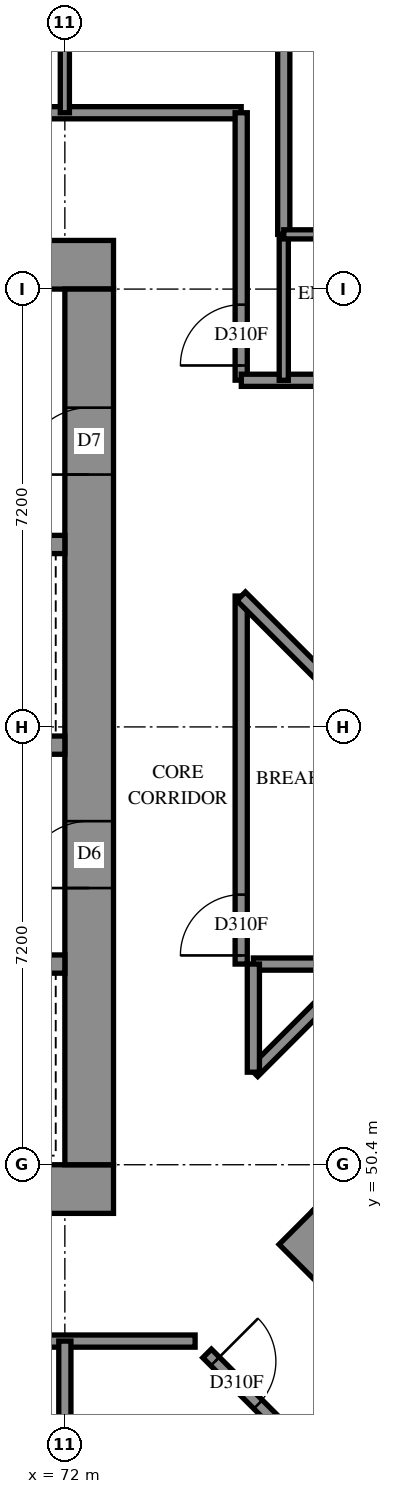
"""IFC4 building model, lengths in metres.
Left out: names, types, materials, properties, quantities, classifications, styles, units other than length and angle.
Written with IfcOpenShell. Run it as: python <this file> out.ifc"""

import sys

from ifc_helpers import new_model, si_unit, direction, frame, frame_2d, origin, place, context, subcontext, project, spatial, rectangle, extrude, element, fill, save


model = new_model("IFC4")
c1 = context("Model", 3, precision=1e-05, world=origin(), true_north=direction((0.0, 1.0)))
c2 = subcontext(c1, "Body", "Model", "MODEL_VIEW")
j1 = project(units=[si_unit("LENGTHUNIT", "METRE"), si_unit("PLANEANGLEUNIT", "RADIAN")], contexts=[c1])
p1 = place(None, origin())
s1 = spatial("IfcSite", under=j1, at=p1, CompositionType="ELEMENT")
p2 = place(p1, origin())
s2 = spatial("IfcBuilding", under=s1, at=p2, CompositionType="ELEMENT")
p3 = place(p2, frame((0.0, 0.0, 98.2)))
s3 = spatial("IfcBuildingStorey", under=s2, at=p3, CompositionType="ELEMENT", Elevation=98.2)
p4 = place(p3, frame((56.8, 50.0, -0.3), z_axis=(0.0, 0.0, 1.0), x_axis=(1.0, 0.0, 0.0)))
e1 = element("IfcWall", 1, at=p4, inside=s3, PredefinedType="SHEAR", context=c2, shape_type="SweptSolid", body=[
    extrude(rectangle(XDim=16.0, YDim=0.8, at=frame_2d((8.0, 0.0))), origin(), (0.0, 0.0, 1.0), 2.7),
])
p5 = place(p3, frame((56.8, 65.2, -0.3), z_axis=(0.0, 0.0, 1.0), x_axis=(1.0, 0.0, 0.0)))
e2 = element("IfcWall", 2, at=p5, inside=s3, PredefinedType="SHEAR", context=c2, shape_type="SweptSolid", body=[
    extrude(rectangle(XDim=16.0, YDim=0.8, at=frame_2d((8.0, 0.0))), origin(), (0.0, 0.0, 1.0), 2.7),
])
p6 = place(p5, frame((10.8, 0.0, 0.3)))
e3 = element("IfcOpeningElement", 3, at=p6, cuts=e2, PredefinedType="OPENING", context=c2, shape_type="SweptSolid", body=[
    extrude(rectangle(XDim=0.8, YDim=2.1, at=frame_2d((0.4, 1.05))), frame((0.0, 0.41, 0.0), z_axis=(0.0, -1.0, 0.0), x_axis=(1.0, 0.0, 0.0)), (0.0, 0.0, 1.0), 0.82),
])
p7 = place(p3, frame((72.4, 50.4, -0.3), z_axis=(0.0, 0.0, 1.0), x_axis=(0.0, 1.0, 0.0)))
e4 = element("IfcWall", 4, at=p7, inside=s3, PredefinedType="SHEAR", context=c2, shape_type="SweptSolid", body=[
    extrude(rectangle(XDim=14.4, YDim=0.8, at=frame_2d((7.2, 0.0))), origin(), (0.0, 0.0, 1.0), 2.7),
])
p8 = place(p7, frame((4.55, 0.0, 0.3)))
e5 = element("IfcOpeningElement", 5, at=p8, cuts=e4, PredefinedType="OPENING", context=c2, shape_type="SweptSolid", body=[
    extrude(rectangle(XDim=1.1, YDim=2.1, at=frame_2d((0.55, 1.05))), frame((0.0, 0.41, 0.0), z_axis=(0.0, -1.0, 0.0), x_axis=(1.0, 0.0, 0.0)), (0.0, 0.0, 1.0), 0.82),
])
p9 = place(p7, frame((11.35, 0.0, 0.3)))
e6 = element("IfcOpeningElement", 6, at=p9, cuts=e4, PredefinedType="OPENING", context=c2, shape_type="SweptSolid", body=[
    extrude(rectangle(XDim=1.1, YDim=2.1, at=frame_2d((0.55, 1.05))), frame((0.0, 0.41, 0.0), z_axis=(0.0, -1.0, 0.0), x_axis=(1.0, 0.0, 0.0)), (0.0, 0.0, 1.0), 0.82),
])
p10 = place(p3, frame((57.6, 53.7, 0.0), z_axis=(0.0, 0.0, 1.0), x_axis=(1.0, 0.0, 0.0)))
e7 = element("IfcWall", 7, at=p10, inside=s3, PredefinedType="SOLIDWALL", context=c2, shape_type="SweptSolid", body=[
    extrude(rectangle(XDim=14.4, YDim=0.3, at=frame_2d((7.2, 0.0))), origin(), (0.0, 0.0, 1.0), 3.1),
])
p11 = place(p10, frame((1.25, 0.0, 0.0)))
e8 = element("IfcOpeningElement", 8, at=p11, cuts=e7, PredefinedType="OPENING", context=c2, shape_type="SweptSolid", body=[
    extrude(rectangle(XDim=1.1, YDim=2.1, at=frame_2d((0.55, 1.05))), frame((0.0, 0.16, 0.0), z_axis=(0.0, -1.0, 0.0), x_axis=(1.0, 0.0, 0.0)), (0.0, 0.0, 1.0), 0.32),
])
p12 = place(p10, frame((4.85, 0.0, 0.0)))
e9 = element("IfcOpeningElement", 9, at=p12, cuts=e7, PredefinedType="OPENING", context=c2, shape_type="SweptSolid", body=[
    extrude(rectangle(XDim=1.1, YDim=2.1, at=frame_2d((0.55, 1.05))), frame((0.0, 0.16, 0.0), z_axis=(0.0, -1.0, 0.0), x_axis=(1.0, 0.0, 0.0)), (0.0, 0.0, 1.0), 0.32),
])
p13 = place(p10, frame((8.45, 0.0, 0.0)))
e10 = element("IfcOpeningElement", 10, at=p13, cuts=e7, PredefinedType="OPENING", context=c2, shape_type="SweptSolid", body=[
    extrude(rectangle(XDim=1.1, YDim=2.1, at=frame_2d((0.55, 1.05))), frame((0.0, 0.16, 0.0), z_axis=(0.0, -1.0, 0.0), x_axis=(1.0, 0.0, 0.0)), (0.0, 0.0, 1.0), 0.32),
])
p14 = place(p10, frame((12.05, 0.0, 0.0)))
e11 = element("IfcOpeningElement", 11, at=p14, cuts=e7, PredefinedType="OPENING", context=c2, shape_type="SweptSolid", body=[
    extrude(rectangle(XDim=1.1, YDim=2.1, at=frame_2d((0.55, 1.05))), frame((0.0, 0.16, 0.0), z_axis=(0.0, -1.0, 0.0), x_axis=(1.0, 0.0, 0.0)), (0.0, 0.0, 1.0), 0.32),
])
p15 = place(p3, frame((57.6, 57.3, 0.0), z_axis=(0.0, 0.0, 1.0), x_axis=(1.0, 0.0, 0.0)))
e12 = element("IfcWall", 12, at=p15, inside=s3, PredefinedType="SOLIDWALL", context=c2, shape_type="SweptSolid", body=[
    extrude(rectangle(XDim=14.4, YDim=0.3, at=frame_2d((7.2, 0.0))), origin(), (0.0, 0.0, 1.0), 3.1),
])
p16 = place(p15, frame((12.05, 0.0, 0.0)))
e13 = element("IfcOpeningElement", 13, at=p16, cuts=e12, PredefinedType="OPENING", context=c2, shape_type="SweptSolid", body=[
    extrude(rectangle(XDim=1.1, YDim=2.1, at=frame_2d((0.55, 1.05))), frame((0.0, 0.16, 0.0), z_axis=(0.0, -1.0, 0.0), x_axis=(1.0, 0.0, 0.0)), (0.0, 0.0, 1.0), 0.32),
])
p17 = place(p3, frame((64.8, 60.6, 0.0), z_axis=(0.0, 0.0, 1.0), x_axis=(1.0, 0.0, 0.0)))
e14 = element("IfcWall", 14, at=p17, inside=s3, PredefinedType="SOLIDWALL", context=c2, shape_type="SweptSolid", body=[
    extrude(rectangle(XDim=7.2, YDim=0.3, at=frame_2d((3.6, 0.0))), origin(), (0.0, 0.0, 1.0), 3.1),
])
p18 = place(p3, frame((75.806, 49.373, -0.3), z_axis=(0.0, 0.0, 1.0), x_axis=(0.7071067812, -0.7071067812, 0.0)))
e15 = element("IfcWall", 15, at=p18, inside=s3, PredefinedType="SHEAR", context=c2, shape_type="SweptSolid", body=[
    extrude(rectangle(XDim=16.0, YDim=0.8, at=frame_2d((8.0, 0.0))), origin(), (0.0, 0.0, 1.0), 2.7),
])
p19 = place(p3, frame((76.372, 49.373, -0.3), z_axis=(0.0, 0.0, 1.0), x_axis=(0.7071067812, 0.7071067812, 0.0)))
e16 = element("IfcWall", 16, at=p19, inside=s3, PredefinedType="SHEAR", context=c2, shape_type="SweptSolid", body=[
    extrude(rectangle(XDim=14.4, YDim=0.8, at=frame_2d((7.2, 0.0))), origin(), (0.0, 0.0, 1.0), 2.7),
])
p20 = place(p19, frame((4.55, 0.0, 0.3)))
e17 = element("IfcOpeningElement", 17, at=p20, cuts=e16, PredefinedType="OPENING", context=c2, shape_type="SweptSolid", body=[
    extrude(rectangle(XDim=1.1, YDim=2.1, at=frame_2d((0.55, 1.05))), frame((0.0, 0.41, 0.0), z_axis=(0.0, -1.0, 0.0), x_axis=(1.0, 0.0, 0.0)), (0.0, 0.0, 1.0), 0.82),
])
p21 = place(p19, frame((11.35, 0.0, 0.3)))
e18 = element("IfcOpeningElement", 18, at=p21, cuts=e16, PredefinedType="OPENING", context=c2, shape_type="SweptSolid", body=[
    extrude(rectangle(XDim=1.1, YDim=2.1, at=frame_2d((0.55, 1.05))), frame((0.0, 0.41, 0.0), z_axis=(0.0, -1.0, 0.0), x_axis=(1.0, 0.0, 0.0)), (0.0, 0.0, 1.0), 0.82),
])
p22 = place(p3, frame((54.7, 67.7, 0.0), z_axis=(0.0, 0.0, 1.0), x_axis=(1.0, 0.0, 0.0)))
e19 = element("IfcWall", 19, at=p22, inside=s3, PredefinedType="PARTITIONING", context=c2, shape_type="SweptSolid", body=[
    extrude(rectangle(XDim=20.2, YDim=0.2, at=frame_2d((10.1, 0.0))), origin(), (0.0, 0.0, 1.0), 3.1),
])
p23 = place(p22, frame((5.25, 0.0, 0.0)))
e20 = element("IfcOpeningElement", 20, at=p23, cuts=e19, PredefinedType="OPENING", context=c2, shape_type="SweptSolid", body=[
    extrude(rectangle(XDim=0.9, YDim=2.1, at=frame_2d((0.45, 1.05))), frame((0.0, 0.11, 0.0), z_axis=(0.0, -1.0, 0.0), x_axis=(1.0, 0.0, 0.0)), (0.0, 0.0, 1.0), 0.22),
])
p24 = place(p22, frame((6.9, 0.0, 0.0)))
e21 = element("IfcOpeningElement", 21, at=p24, cuts=e19, PredefinedType="OPENING", context=c2, shape_type="SweptSolid", body=[
    extrude(rectangle(XDim=0.9, YDim=2.1, at=frame_2d((0.45, 1.05))), frame((0.0, 0.11, 0.0), z_axis=(0.0, -1.0, 0.0), x_axis=(1.0, 0.0, 0.0)), (0.0, 0.0, 1.0), 0.22),
])
p25 = place(p22, frame((12.45, 0.0, 0.0)))
e22 = element("IfcOpeningElement", 22, at=p25, cuts=e19, PredefinedType="OPENING", context=c2, shape_type="SweptSolid", body=[
    extrude(rectangle(XDim=0.9, YDim=2.1, at=frame_2d((0.45, 1.05))), frame((0.0, 0.11, 0.0), z_axis=(0.0, -1.0, 0.0), x_axis=(1.0, 0.0, 0.0)), (0.0, 0.0, 1.0), 0.22),
])
p26 = place(p22, frame((14.1, 0.0, 0.0)))
e23 = element("IfcOpeningElement", 23, at=p26, cuts=e19, PredefinedType="OPENING", context=c2, shape_type="SweptSolid", body=[
    extrude(rectangle(XDim=0.9, YDim=2.1, at=frame_2d((0.45, 1.05))), frame((0.0, 0.11, 0.0), z_axis=(0.0, -1.0, 0.0), x_axis=(1.0, 0.0, 0.0)), (0.0, 0.0, 1.0), 0.22),
])
p27 = place(p3, frame((54.7, 47.5, 0.0), z_axis=(0.0, 0.0, 1.0), x_axis=(1.0, 0.0, 0.0)))
e24 = element("IfcWall", 24, at=p27, inside=s3, PredefinedType="PARTITIONING", context=c2, shape_type="SweptSolid", body=[
    extrude(rectangle(XDim=19.442, YDim=0.2, at=frame_2d((9.721, 0.0))), origin(), (0.0, 0.0, 1.0), 3.1),
])
p28 = place(p27, frame((5.2, 0.0, 0.0)))
e25 = element("IfcOpeningElement", 25, at=p28, cuts=e24, PredefinedType="OPENING", context=c2, shape_type="SweptSolid", body=[
    extrude(rectangle(XDim=0.9, YDim=2.1, at=frame_2d((0.45, 1.05))), frame((0.0, 0.11, 0.0), z_axis=(0.0, -1.0, 0.0), x_axis=(1.0, 0.0, 0.0)), (0.0, 0.0, 1.0), 0.22),
])
p29 = place(p27, frame((6.9, 0.0, 0.0)))
e26 = element("IfcOpeningElement", 26, at=p29, cuts=e24, PredefinedType="OPENING", context=c2, shape_type="SweptSolid", body=[
    extrude(rectangle(XDim=0.9, YDim=2.1, at=frame_2d((0.45, 1.05))), frame((0.0, 0.11, 0.0), z_axis=(0.0, -1.0, 0.0), x_axis=(1.0, 0.0, 0.0)), (0.0, 0.0, 1.0), 0.22),
])
p30 = place(p27, frame((13.963, 0.0, 0.0)))
e27 = element("IfcOpeningElement", 27, at=p30, cuts=e24, PredefinedType="OPENING", context=c2, shape_type="SweptSolid", body=[
    extrude(rectangle(XDim=1.0, YDim=2.1, at=frame_2d((0.5, 1.05))), frame((0.0, 0.11, 0.0), z_axis=(0.0, -1.0, 0.0), x_axis=(1.0, 0.0, 0.0)), (0.0, 0.0, 1.0), 0.22),
])
p31 = place(p3, frame((75.6, 65.7, 0.0), z_axis=(0.0, 0.0, 1.0), x_axis=(0.0, 1.0, 0.0)))
e28 = element("IfcWall", 28, at=p31, inside=s3, PredefinedType="PARTITIONING", context=c2, shape_type="SweptSolid", body=[
    extrude(rectangle(XDim=7.033, YDim=0.2, at=frame_2d((3.517, 0.0))), origin(), (0.0, 0.0, 1.0), 3.1),
])
p32 = place(p3, frame((74.9, 53.7, 0.0), z_axis=(0.0, 0.0, 1.0), x_axis=(0.0, 1.0, 0.0)))
e29 = element("IfcWall", 29, at=p32, inside=s3, PredefinedType="PARTITIONING", context=c2, shape_type="SweptSolid", body=[
    extrude(rectangle(XDim=6.052, YDim=0.2, at=frame_2d((3.026, 0.0))), origin(), (0.0, 0.0, 1.0), 3.1),
])
p33 = place(p32, frame((0.142, 0.0, 0.0)))
e30 = element("IfcOpeningElement", 30, at=p33, cuts=e29, PredefinedType="OPENING", context=c2, shape_type="SweptSolid", body=[
    extrude(rectangle(XDim=1.0, YDim=2.1, at=frame_2d((0.5, 1.05))), frame((0.0, 0.11, 0.0), z_axis=(0.0, -1.0, 0.0), x_axis=(1.0, 0.0, 0.0)), (0.0, 0.0, 1.0), 0.22),
])
p34 = place(p3, frame((74.9, 63.302, 0.0), z_axis=(0.0, 0.0, 1.0), x_axis=(0.0, 1.0, 0.0)))
e31 = element("IfcWall", 31, at=p34, inside=s3, PredefinedType="PARTITIONING", context=c2, shape_type="SweptSolid", body=[
    extrude(rectangle(XDim=4.398, YDim=0.2, at=frame_2d((2.199, 0.0))), origin(), (0.0, 0.0, 1.0), 3.1),
])
p35 = place(p34, frame((0.242, 0.0, 0.0)))
e32 = element("IfcOpeningElement", 32, at=p35, cuts=e31, PredefinedType="OPENING", context=c2, shape_type="SweptSolid", body=[
    extrude(rectangle(XDim=1.0, YDim=2.1, at=frame_2d((0.5, 1.05))), frame((0.0, 0.11, 0.0), z_axis=(0.0, -1.0, 0.0), x_axis=(1.0, 0.0, 0.0)), (0.0, 0.0, 1.0), 0.22),
])
p36 = place(p3, frame((74.902, 63.3, 0.0), z_axis=(0.0, 0.0, 1.0), x_axis=(1.0, 0.0, 0.0)))
e33 = element("IfcWall", 33, at=p36, inside=s3, PredefinedType="PARTITIONING", context=c2, shape_type="SweptSolid", body=[
    extrude(rectangle(XDim=4.298, YDim=0.2, at=frame_2d((2.149, 0.0))), origin(), (0.0, 0.0, 1.0), 3.1),
])
p37 = place(p36, frame((2.888, 0.0, 0.0)))
e34 = element("IfcOpeningElement", 34, at=p37, cuts=e33, PredefinedType="OPENING", context=c2, shape_type="SweptSolid", body=[
    extrude(rectangle(XDim=0.9, YDim=2.1, at=frame_2d((0.45, 1.05))), frame((0.0, 0.11, 0.0), z_axis=(0.0, -1.0, 0.0), x_axis=(1.0, 0.0, 0.0)), (0.0, 0.0, 1.0), 0.22),
])
p38 = place(p3, frame((72.0, 43.7, 0.0), z_axis=(0.0, 0.0, 1.0), x_axis=(0.0, 1.0, 0.0)))
e35 = element("IfcWall", 35, at=p38, inside=s3, PredefinedType="PARTITIONING", context=c2, shape_type="SweptSolid", body=[
    extrude(rectangle(XDim=3.8, YDim=0.2, at=frame_2d((1.9, 0.0))), origin(), (0.0, 0.0, 1.0), 3.1),
])
p39 = place(p3, frame((74.899, 59.749, 0.0), z_axis=(0.0, 0.0, 1.0), x_axis=(0.7071067812, -0.7071067812, 0.0)))
e36 = element("IfcWall", 36, at=p39, inside=s3, PredefinedType="PARTITIONING", context=c2, shape_type="SweptSolid", body=[
    extrude(rectangle(XDim=3.601, YDim=0.2, at=frame_2d((1.8, 0.0))), origin(), (0.0, 0.0, 1.0), 3.1),
])
p40 = place(p3, frame((75.102, 51.922, 0.0), z_axis=(0.0, 0.0, 1.0), x_axis=(0.7071067812, 0.7071067812, 0.0)))
e37 = element("IfcWall", 37, at=p40, inside=s3, PredefinedType="PARTITIONING", context=c2, shape_type="SweptSolid", body=[
    extrude(rectangle(XDim=2.514, YDim=0.2, at=frame_2d((1.257, 0.0))), origin(), (0.0, 0.0, 1.0), 3.1),
])
for number, where, z_axis, x_axis in (
    (38, (75.6, 63.3, 0.0), (0.0, 0.0, 1.0), (0.0, 1.0, 0.0)),
    (39, (72.0, 67.7, 0.0), (0.0, 0.0, 1.0), (0.0, 1.0, 0.0)),
):
    element("IfcWall", number, at=place(p3, frame(where, z_axis=z_axis, x_axis=x_axis)), inside=s3, PredefinedType="PARTITIONING", context=c2, shape_type="SweptSolid", body=[
        extrude(rectangle(XDim=2.4, YDim=0.15, at=frame_2d((1.2, 0.0))), origin(), (0.0, 0.0, 1.0), 3.1),
    ])
p41 = place(p3, frame((75.6, 65.7, 0.0), z_axis=(0.0, 0.0, 1.0), x_axis=(1.0, 0.0, 0.0)))
e40 = element("IfcWall", 40, at=p41, inside=s3, PredefinedType="PARTITIONING", context=c2, shape_type="SweptSolid", body=[
    extrude(rectangle(XDim=1.9, YDim=0.15, at=frame_2d((0.95, 0.0))), origin(), (0.0, 0.0, 1.0), 3.1),
])
p42 = place(p41, frame((0.607, 0.0, 0.0)))
e41 = element("IfcOpeningElement", 41, at=p42, cuts=e40, PredefinedType="OPENING", context=c2, shape_type="SweptSolid", body=[
    extrude(rectangle(XDim=0.8, YDim=2.1, at=frame_2d((0.4, 1.05))), frame((0.0, 0.085, 0.0), z_axis=(0.0, -1.0, 0.0), x_axis=(1.0, 0.0, 0.0)), (0.0, 0.0, 1.0), 0.17),
])
p43 = place(p3, frame((75.1, 53.7, 0.0), z_axis=(0.0, 0.0, 1.0), x_axis=(1.0, 0.0, 0.0)))
e42 = element("IfcWall", 42, at=p43, inside=s3, PredefinedType="PARTITIONING", context=c2, shape_type="SweptSolid", body=[
    extrude(rectangle(XDim=1.78, YDim=0.2, at=frame_2d((0.89, 0.0))), origin(), (0.0, 0.0, 1.0), 3.1),
])
p44 = place(p3, frame((74.339, 47.297, 0.0), z_axis=(0.0, 0.0, 1.0), x_axis=(0.7071067812, -0.7071067812, 0.0)))
e43 = element("IfcWall", 43, at=p44, inside=s3, PredefinedType="PARTITIONING", context=c2, shape_type="SweptSolid", body=[
    extrude(rectangle(XDim=1.779, YDim=0.2, at=frame_2d((0.889, 0.0))), origin(), (0.0, 0.0, 1.0), 3.1),
])
p45 = place(p44, frame((0.186, 0.0, 0.0)))
e44 = element("IfcOpeningElement", 44, at=p45, cuts=e43, PredefinedType="OPENING", context=c2, shape_type="SweptSolid", body=[
    extrude(rectangle(XDim=1.0, YDim=2.1, at=frame_2d((0.5, 1.05))), frame((0.0, 0.11, 0.0), z_axis=(0.0, -1.0, 0.0), x_axis=(1.0, 0.0, 0.0)), (0.0, 0.0, 1.0), 0.22),
])
p46 = place(p3, frame((75.1, 51.922, 0.0), z_axis=(0.0, 0.0, 1.0), x_axis=(0.0, 1.0, 0.0)))
e45 = element("IfcWall", 45, at=p46, inside=s3, PredefinedType="PARTITIONING", context=c2, shape_type="SweptSolid", body=[
    extrude(rectangle(XDim=1.778, YDim=0.2, at=frame_2d((0.889, 0.0))), origin(), (0.0, 0.0, 1.0), 3.1),
])
p47 = place(p8, origin())
e46 = element("IfcDoor", 46, at=p47, inside=s3, OperationType="DOUBLE_DOOR_SINGLE_SWING", PredefinedType="DOOR", context=c2, shape_type="SweptSolid", body=[
    extrude(rectangle(XDim=1.1, YDim=2.1, at=frame_2d((0.55, 1.05))), frame((0.0, 0.025, 0.0), z_axis=(0.0, -1.0, 0.0), x_axis=(1.0, 0.0, 0.0)), (0.0, 0.0, 1.0), 0.05),
])
fill(e5, e46)
p48 = place(p9, origin())
e47 = element("IfcDoor", 47, at=p48, inside=s3, OperationType="SINGLE_SWING_RIGHT", PredefinedType="DOOR", context=c2, shape_type="SweptSolid", body=[
    extrude(rectangle(XDim=1.1, YDim=2.1, at=frame_2d((0.55, 1.05))), frame((0.0, 0.025, 0.0), z_axis=(0.0, -1.0, 0.0), x_axis=(1.0, 0.0, 0.0)), (0.0, 0.0, 1.0), 0.05),
])
fill(e6, e47)
p49 = place(p33, origin())
e48 = element("IfcDoor", 48, at=p49, inside=s3, OperationType="SINGLE_SWING_LEFT", PredefinedType="DOOR", context=c2, shape_type="SweptSolid", body=[
    extrude(rectangle(XDim=1.0, YDim=2.1, at=frame_2d((0.5, 1.05))), frame((0.0, 0.025, 0.0), z_axis=(0.0, -1.0, 0.0), x_axis=(1.0, 0.0, 0.0)), (0.0, 0.0, 1.0), 0.05),
])
fill(e30, e48)
p50 = place(p35, origin())
e49 = element("IfcDoor", 49, at=p50, inside=s3, OperationType="SINGLE_SWING_RIGHT", PredefinedType="DOOR", context=c2, shape_type="SweptSolid", body=[
    extrude(rectangle(XDim=1.0, YDim=2.1, at=frame_2d((0.5, 1.05))), frame((0.0, 0.025, 0.0), z_axis=(0.0, -1.0, 0.0), x_axis=(1.0, 0.0, 0.0)), (0.0, 0.0, 1.0), 0.05),
])
fill(e32, e49)
p51 = place(p45, origin())
e50 = element("IfcDoor", 50, at=p51, inside=s3, OperationType="SINGLE_SWING_LEFT", PredefinedType="DOOR", context=c2, shape_type="SweptSolid", body=[
    extrude(rectangle(XDim=1.0, YDim=2.1, at=frame_2d((0.5, 1.05))), frame((0.0, 0.025, 0.0), z_axis=(0.0, -1.0, 0.0), x_axis=(1.0, 0.0, 0.0)), (0.0, 0.0, 1.0), 0.05),
])
fill(e44, e50)
save(model, sys.argv[1])
